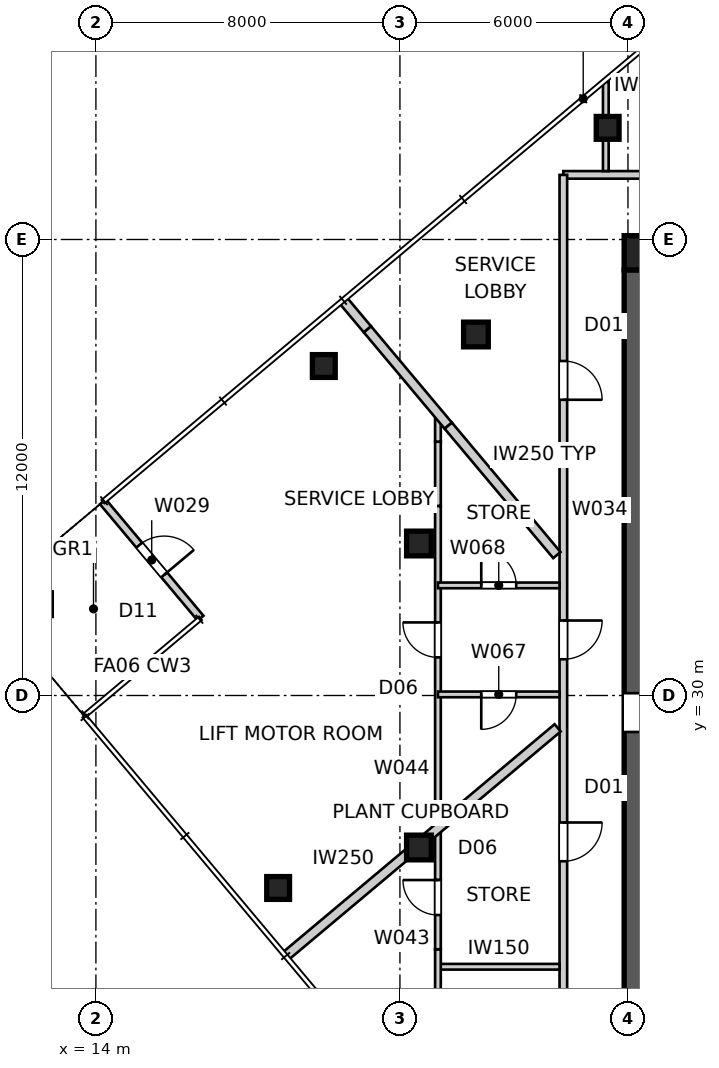
"""IFC4 building model, lengths in metres.
Left out: names, types, materials, properties, quantities, classifications, styles, units other than length and angle.
Written with IfcOpenShell. Run it as: python <this file> out.ifc"""

import sys

from ifc_helpers import new_model, si_unit, direction, frame, frame_2d, origin, origin_2d, place, context, subcontext, project, spatial, polyline, rectangle, outline, extrude, element, fill, save


model = new_model("IFC4")
c1 = context("Model", 3, precision=1e-05, world=origin(), true_north=direction((0.0, 1.0)))
c2 = subcontext(c1, "Body", "Model", "MODEL_VIEW")
j1 = project(units=[si_unit("LENGTHUNIT", "METRE"), si_unit("PLANEANGLEUNIT", "RADIAN")], contexts=[c1])
p1 = place(None, origin())
s1 = spatial("IfcSite", under=j1, at=p1, CompositionType="ELEMENT")
p2 = place(p1, origin())
s2 = spatial("IfcBuilding", under=s1, at=p2, CompositionType="ELEMENT")
p3 = place(p2, frame((0.0, 0.0, 304.3)))
s3 = spatial("IfcBuildingStorey", under=s2, at=p3, CompositionType="ELEMENT", Elevation=304.3)
p4 = place(p3, frame((28.35, 41.2, 0.0), z_axis=(0.0, 0.0, 1.0), x_axis=(0.0, -1.0, 0.0)))
e1 = element("IfcWall", 1, at=p4, inside=s3, PredefinedType="SHEAR", context=c2, shape_type="SweptSolid", body=[
    extrude(outline(polyline([(0.0, -0.45), (22.4, -0.45), (22.4, -0.025), (22.85, -0.025), (22.85, 0.025), (22.4, 0.025), (22.4, 0.45), (0.0, 0.45), (0.0, 0.025), (-0.45, 0.025), (-0.45, -0.025), (0.0, -0.025), (0.0, -0.45)])), origin(), (0.0, 0.0, 1.0), 4.5),
])
p5 = place(p4, frame((11.14, 0.0, 0.0)))
e2 = element("IfcOpeningElement", 2, at=p5, cuts=e1, PredefinedType="OPENING", context=c2, shape_type="SweptSolid", body=[
    extrude(rectangle(XDim=1.02, YDim=2.4, at=frame_2d((0.51, 1.2))), frame((0.0, 0.46, 0.0), z_axis=(0.0, -1.0, 0.0), x_axis=(1.0, 0.0, 0.0)), (0.0, 0.0, 1.0), 0.92),
])
p6 = place(p3, frame((28.35, 41.65, 0.0), z_axis=(0.0, 0.0, 1.0), x_axis=(1.0, 0.0, 0.0)))
e3 = element("IfcColumn", 3, at=p6, inside=s3, PredefinedType="COLUMN", context=c2, shape_type="SweptSolid", body=[
    extrude(rectangle(XDim=0.9, YDim=0.9, at=origin_2d()), origin(), (0.0, 0.0, 1.0), 4.5),
])
for number, where, z_axis, x_axis in (
    (4, (27.466, 44.938, 0.0), (0.0, 0.0, 1.0), (1.0, 0.0, 0.0)),
    (5, (19.997, 38.671, 0.0), (0.0, 0.0, 1.0), (1.0, 0.0, 0.0)),
    (6, (18.795, 24.935, 0.0), (0.0, 0.0, 1.0), (1.0, 0.0, 0.0)),
):
    element("IfcColumn", number, at=place(p3, frame(where, z_axis=z_axis, x_axis=x_axis)), inside=s3, PredefinedType="COLUMN", context=c2, shape_type="SweptSolid", body=[
        extrude(rectangle(XDim=0.6, YDim=0.6, at=origin_2d()), origin(), (0.0, 0.0, 1.0), 4.5),
    ])
for number, where, z_axis, x_axis in (
    (7, (24.0, 39.5, 0.0), (0.0, 0.0, 1.0), (1.0, 0.0, 0.0)),
    (8, (22.5, 34.0, 0.0), (0.0, 0.0, 1.0), (1.0, 0.0, 0.0)),
    (9, (22.5, 26.0, 0.0), (0.0, 0.0, 1.0), (1.0, 0.0, 0.0)),
):
    element("IfcColumn", number, at=place(p3, frame(where, z_axis=z_axis, x_axis=x_axis)), inside=s3, PredefinedType="COLUMN", context=c2, shape_type="SweptSolid", body=[
        extrude(rectangle(XDim=0.65, YDim=0.65, at=origin_2d()), origin(), (0.0, 0.0, 1.0), 4.5),
    ])
p7 = place(p3, frame((14.183, 35.098, 0.0), z_axis=(0.0, 0.0, 1.0), x_axis=(0.642768287094, -0.766060656284, 0.0)))
e10 = element("IfcWall", 10, at=p7, inside=s3, PredefinedType="SOLIDWALL", context=c2, shape_type="SweptSolid", body=[
    extrude(rectangle(XDim=4.0, YDim=0.2, at=frame_2d((2.0, 0.0))), origin(), (0.0, 0.0, 1.0), 4.25),
])
p8 = place(p7, frame((1.49, 0.0, 0.0)))
e11 = element("IfcOpeningElement", 11, at=p8, cuts=e10, PredefinedType="OPENING", context=c2, shape_type="SweptSolid", body=[
    extrude(rectangle(XDim=1.02, YDim=2.1, at=frame_2d((0.51, 1.05))), frame((0.0, 0.11, 0.0), z_axis=(0.0, -1.0, 0.0), x_axis=(1.0, 0.0, 0.0)), (0.0, 0.0, 1.0), 0.22),
])
p9 = place(p3, frame((53.7, 43.7, 0.0), z_axis=(0.0, 0.0, 1.0), x_axis=(-1.0, 0.0, 0.0)))
e12 = element("IfcWall", 12, at=p9, inside=s3, PredefinedType="PARTITIONING", context=c2, shape_type="SweptSolid", body=[
    extrude(rectangle(XDim=27.4, YDim=0.2, at=frame_2d((13.7, 0.0))), origin(), (0.0, 0.0, 1.0), 4.25),
])
p10 = place(p9, frame((20.621, 0.0, 0.0)))
e13 = element("IfcOpeningElement", 13, at=p10, cuts=e12, PredefinedType="OPENING", context=c2, shape_type="SweptSolid", body=[
    extrude(rectangle(XDim=1.02, YDim=2.34, at=frame_2d((0.51, 1.17))), frame((0.0, 0.11, 0.0), z_axis=(0.0, -1.0, 0.0), x_axis=(1.0, 0.0, 0.0)), (0.0, 0.0, 1.0), 0.22),
])
p11 = place(p9, frame((6.053, 0.0, 0.0)))
e14 = element("IfcOpeningElement", 14, at=p11, cuts=e12, PredefinedType="OPENING", context=c2, shape_type="SweptSolid", body=[
    extrude(rectangle(XDim=1.02, YDim=2.34, at=frame_2d((0.51, 1.17))), frame((0.0, 0.11, 0.0), z_axis=(0.0, -1.0, 0.0), x_axis=(1.0, 0.0, 0.0)), (0.0, 0.0, 1.0), 0.22),
])
p12 = place(p9, frame((12.574, 0.0, 0.0)))
e15 = element("IfcOpeningElement", 15, at=p12, cuts=e12, PredefinedType="OPENING", context=c2, shape_type="SweptSolid", body=[
    extrude(rectangle(XDim=1.02, YDim=2.34, at=frame_2d((0.51, 1.17))), frame((0.0, 0.11, 0.0), z_axis=(0.0, -1.0, 0.0), x_axis=(1.0, 0.0, 0.0)), (0.0, 0.0, 1.0), 0.22),
])
p13 = place(p3, frame((26.3, 43.7, 0.0), z_axis=(0.0, 0.0, 1.0), x_axis=(0.0, -1.0, 0.0)))
e16 = element("IfcWall", 16, at=p13, inside=s3, PredefinedType="PARTITIONING", context=c2, shape_type="SweptSolid", body=[
    extrude(rectangle(XDim=27.4, YDim=0.2, at=frame_2d((13.7, 0.0))), origin(), (0.0, 0.0, 1.0), 4.25),
])
p14 = place(p13, frame((4.898, 0.0, 0.0)))
e17 = element("IfcOpeningElement", 17, at=p14, cuts=e16, PredefinedType="OPENING", context=c2, shape_type="SweptSolid", body=[
    extrude(rectangle(XDim=1.02, YDim=2.34, at=frame_2d((0.51, 1.17))), frame((0.0, 0.11, 0.0), z_axis=(0.0, -1.0, 0.0), x_axis=(1.0, 0.0, 0.0)), (0.0, 0.0, 1.0), 0.22),
])
p15 = place(p13, frame((17.042, 0.0, 0.0)))
e18 = element("IfcOpeningElement", 18, at=p15, cuts=e16, PredefinedType="OPENING", context=c2, shape_type="SweptSolid", body=[
    extrude(rectangle(XDim=1.02, YDim=2.34, at=frame_2d((0.51, 1.17))), frame((0.0, 0.11, 0.0), z_axis=(0.0, -1.0, 0.0), x_axis=(1.0, 0.0, 0.0)), (0.0, 0.0, 1.0), 0.22),
])
p16 = place(p13, frame((23.434, 0.0, 0.0)))
e19 = element("IfcOpeningElement", 19, at=p16, cuts=e16, PredefinedType="OPENING", context=c2, shape_type="SweptSolid", body=[
    extrude(rectangle(XDim=1.02, YDim=2.34, at=frame_2d((0.51, 1.17))), frame((0.0, 0.11, 0.0), z_axis=(0.0, -1.0, 0.0), x_axis=(1.0, 0.0, 0.0)), (0.0, 0.0, 1.0), 0.22),
])
p17 = place(p13, frame((11.727, 0.0, 0.0)))
e20 = element("IfcOpeningElement", 20, at=p17, cuts=e16, PredefinedType="OPENING", context=c2, shape_type="SweptSolid", body=[
    extrude(rectangle(XDim=1.02, YDim=2.34, at=frame_2d((0.51, 1.17))), frame((0.0, 0.11, 0.0), z_axis=(0.0, -1.0, 0.0), x_axis=(1.0, 0.0, 0.0)), (0.0, 0.0, 1.0), 0.22),
])
p18 = place(p3, frame((20.503, 40.401, 0.0), z_axis=(0.0, 0.0, 1.0), x_axis=(0.64277405138, -0.766055819685, 0.0)))
e21 = element("IfcWall", 21, at=p18, inside=s3, PredefinedType="PARTITIONING", context=c2, shape_type="SweptSolid", body=[
    extrude(rectangle(XDim=1.0, YDim=0.25, at=frame_2d((0.5, 0.0))), origin(), (0.0, 0.0, 1.0), 4.25),
])
p19 = place(p3, frame((21.146, 39.635, 0.0), z_axis=(0.0, 0.0, 1.0), x_axis=(0.642823301165, -0.766014492995, 0.0)))
e22 = element("IfcWall", 22, at=p19, inside=s3, PredefinedType="PARTITIONING", context=c2, shape_type="SweptSolid", body=[
    extrude(rectangle(XDim=3.308, YDim=0.25, at=frame_2d((1.654, 0.0))), origin(), (0.0, 0.0, 1.0), 3.638),
])
p20 = place(p3, frame((23.272, 37.101, 0.0), z_axis=(0.0, 0.0, 1.0), x_axis=(0.642778620996, -0.766051985436, 0.0)))
e23 = element("IfcWall", 23, at=p20, inside=s3, PredefinedType="PARTITIONING", context=c2, shape_type="SweptSolid", body=[
    extrude(rectangle(XDim=4.446, YDim=0.25, at=frame_2d((2.223, 0.0))), origin(), (0.0, 0.0, 1.0), 4.25),
])
p21 = place(p3, frame((18.993, 23.143, 0.0), z_axis=(0.0, 0.0, 1.0), x_axis=(0.766045019392, 0.64278692291, 0.0)))
e24 = element("IfcWall", 24, at=p21, inside=s3, PredefinedType="PARTITIONING", context=c2, shape_type="SweptSolid", body=[
    extrude(rectangle(XDim=9.343, YDim=0.25, at=frame_2d((4.671, 0.0))), origin(), (0.0, 0.0, 1.0), 4.25),
])
p22 = place(p3, frame((23.0, 22.862, 0.0), z_axis=(0.0, 0.0, 1.0), x_axis=(1.0, 0.0, 0.0)))
e25 = element("IfcWall", 25, at=p22, inside=s3, PredefinedType="SOLIDWALL", context=c2, shape_type="SweptSolid", body=[
    extrude(rectangle(XDim=3.2, YDim=0.15, at=frame_2d((1.6, 0.0))), origin(), (0.0, 0.0, 1.0), 4.25),
])
p23 = place(p3, frame((23.0, 18.43, 0.0), z_axis=(0.0, 0.0, 1.0), x_axis=(0.0, 1.0, 0.0)))
e26 = element("IfcWall", 26, at=p23, inside=s3, PredefinedType="SOLIDWALL", context=c2, shape_type="SweptSolid", body=[
    extrude(rectangle(XDim=4.892, YDim=0.15, at=frame_2d((2.446, 0.0))), origin(), (0.0, 0.0, 1.0), 4.25),
])
p24 = place(p3, frame((23.0, 23.322, 0.0), z_axis=(0.0, 0.0, 1.0), x_axis=(0.0, 1.0, 0.0)))
e27 = element("IfcWall", 27, at=p24, inside=s3, PredefinedType="SOLIDWALL", context=c2, shape_type="SweptSolid", body=[
    extrude(rectangle(XDim=1.822, YDim=0.15, at=frame_2d((0.911, 0.0))), origin(), (0.0, 0.0, 1.0), 3.25),
])
p25 = place(p24, frame((0.902, 0.0, 0.0)))
e28 = element("IfcOpeningElement", 28, at=p25, cuts=e27, PredefinedType="OPENING", context=c2, shape_type="SweptSolid", body=[
    extrude(rectangle(XDim=0.92, YDim=2.1, at=frame_2d((0.46, 1.05))), frame((0.0, 0.085, 0.0), z_axis=(0.0, -1.0, 0.0), x_axis=(1.0, 0.0, 0.0)), (0.0, 0.0, 1.0), 0.17),
])
p26 = place(p3, frame((23.0, 25.143, 0.0), z_axis=(0.0, 0.0, 1.0), x_axis=(0.0, 1.0, 0.0)))
e29 = element("IfcWall", 29, at=p26, inside=s3, PredefinedType="SOLIDWALL", context=c2, shape_type="SweptSolid", body=[
    extrude(rectangle(XDim=9.845, YDim=0.15, at=frame_2d((4.922, 0.0))), origin(), (0.0, 0.0, 1.0), 4.25),
])
p27 = place(p26, frame((5.86, 0.0, 0.0)))
e30 = element("IfcOpeningElement", 30, at=p27, cuts=e29, PredefinedType="OPENING", context=c2, shape_type="SweptSolid", body=[
    extrude(rectangle(XDim=0.92, YDim=2.1, at=frame_2d((0.46, 1.05))), frame((0.0, 0.085, 0.0), z_axis=(0.0, -1.0, 0.0), x_axis=(1.0, 0.0, 0.0)), (0.0, 0.0, 1.0), 0.17),
])
p28 = place(p3, frame((23.0, 34.988, 0.0), z_axis=(0.0, 0.0, 1.0), x_axis=(0.0, 1.0, 0.0)))
e31 = element("IfcWall", 31, at=p28, inside=s3, PredefinedType="SOLIDWALL", context=c2, shape_type="SweptSolid", body=[
    extrude(rectangle(XDim=1.69, YDim=0.15, at=frame_2d((0.845, 0.0))), origin(), (0.0, 0.0, 1.0), 3.25),
])
p29 = place(p3, frame((23.0, 36.678, 0.0), z_axis=(0.0, 0.0, 1.0), x_axis=(0.0, 1.0, 0.0)))
e32 = element("IfcWall", 32, at=p29, inside=s3, PredefinedType="SOLIDWALL", context=c2, shape_type="SweptSolid", body=[
    extrude(rectangle(XDim=0.747, YDim=0.15, at=frame_2d((0.373, 0.0))), origin(), (0.0, 0.0, 1.0), 4.25),
])
p30 = place(p3, frame((27.417, 46.15, 0.0), z_axis=(0.0, 0.0, 1.0), x_axis=(0.0, -1.0, 0.0)))
e33 = element("IfcWall", 33, at=p30, inside=s3, PredefinedType="SOLIDWALL", context=c2, shape_type="SweptSolid", body=[
    extrude(rectangle(XDim=2.35, YDim=0.15, at=frame_2d((1.175, 0.0))), origin(), (0.0, 0.0, 1.0), 4.25),
])
p31 = place(p3, frame((26.2, 30.029, 0.0), z_axis=(0.0, 0.0, 1.0), x_axis=(-1.0, 0.0, 0.0)))
e34 = element("IfcWall", 34, at=p31, inside=s3, PredefinedType="SOLIDWALL", context=c2, shape_type="SweptSolid", body=[
    extrude(rectangle(XDim=3.2, YDim=0.15, at=frame_2d((1.6, 0.0))), origin(), (0.0, 0.0, 1.0), 3.722),
])
p32 = place(p31, frame((1.14, 0.0, 0.0)))
e35 = element("IfcOpeningElement", 35, at=p32, cuts=e34, PredefinedType="OPENING", context=c2, shape_type="SweptSolid", body=[
    extrude(rectangle(XDim=0.92, YDim=2.1, at=frame_2d((0.46, 1.05))), frame((0.0, 0.085, 0.0), z_axis=(0.0, -1.0, 0.0), x_axis=(1.0, 0.0, 0.0)), (0.0, 0.0, 1.0), 0.17),
])
p33 = place(p3, frame((23.0, 32.897, 0.0), z_axis=(0.0, 0.0, 1.0), x_axis=(1.0, 0.0, 0.0)))
e36 = element("IfcWall", 36, at=p33, inside=s3, PredefinedType="SOLIDWALL", context=c2, shape_type="SweptSolid", body=[
    extrude(rectangle(XDim=3.2, YDim=0.15, at=frame_2d((1.6, 0.0))), origin(), (0.0, 0.0, 1.0), 3.722),
])
p34 = place(p33, frame((1.14, 0.0, 0.0)))
e37 = element("IfcOpeningElement", 37, at=p34, cuts=e36, PredefinedType="OPENING", context=c2, shape_type="SweptSolid", body=[
    extrude(rectangle(XDim=0.92, YDim=2.1, at=frame_2d((0.46, 1.05))), frame((0.0, 0.085, 0.0), z_axis=(0.0, -1.0, 0.0), x_axis=(1.0, 0.0, 0.0)), (0.0, 0.0, 1.0), 0.17),
])
p35 = place(p8, origin())
e38 = element("IfcDoor", 38, at=p35, inside=s3, OperationType="SINGLE_SWING_RIGHT", PredefinedType="DOOR", context=c2, shape_type="SweptSolid", body=[
    extrude(rectangle(XDim=1.02, YDim=2.1, at=frame_2d((0.51, 1.05))), frame((0.0, 0.025, 0.0), z_axis=(0.0, -1.0, 0.0), x_axis=(1.0, 0.0, 0.0)), (0.0, 0.0, 1.0), 0.05),
])
fill(e11, e38)
p36 = place(p14, origin())
e39 = element("IfcDoor", 39, at=p36, inside=s3, OperationType="SINGLE_SWING_RIGHT", PredefinedType="DOOR", context=c2, shape_type="SweptSolid", body=[
    extrude(rectangle(XDim=1.02, YDim=2.34, at=frame_2d((0.51, 1.17))), frame((0.0, 0.025, 0.0), z_axis=(0.0, -1.0, 0.0), x_axis=(1.0, 0.0, 0.0)), (0.0, 0.0, 1.0), 0.05),
])
fill(e17, e39)
p37 = place(p15, origin())
e40 = element("IfcDoor", 40, at=p37, inside=s3, OperationType="SINGLE_SWING_LEFT", PredefinedType="DOOR", context=c2, shape_type="SweptSolid", body=[
    extrude(rectangle(XDim=1.02, YDim=2.34, at=frame_2d((0.51, 1.17))), frame((0.0, 0.025, 0.0), z_axis=(0.0, -1.0, 0.0), x_axis=(1.0, 0.0, 0.0)), (0.0, 0.0, 1.0), 0.05),
])
fill(e18, e40)
p38 = place(p17, origin())
e41 = element("IfcDoor", 41, at=p38, inside=s3, OperationType="SINGLE_SWING_LEFT", PredefinedType="DOOR", context=c2, shape_type="SweptSolid", body=[
    extrude(rectangle(XDim=1.02, YDim=2.34, at=frame_2d((0.51, 1.17))), frame((0.0, 0.025, 0.0), z_axis=(0.0, -1.0, 0.0), x_axis=(1.0, 0.0, 0.0)), (0.0, 0.0, 1.0), 0.05),
])
fill(e20, e41)
p39 = place(p25, origin())
e42 = element("IfcDoor", 42, at=p39, inside=s3, OperationType="SINGLE_SWING_RIGHT", PredefinedType="DOOR", context=c2, shape_type="SweptSolid", body=[
    extrude(rectangle(XDim=0.92, YDim=2.1, at=frame_2d((0.46, 1.05))), frame((0.0, 0.025, 0.0), z_axis=(0.0, -1.0, 0.0), x_axis=(1.0, 0.0, 0.0)), (0.0, 0.0, 1.0), 0.05),
])
fill(e28, e42)
p40 = place(p32, origin())
e43 = element("IfcDoor", 43, at=p40, inside=s3, OperationType="SINGLE_SWING_RIGHT", PredefinedType="DOOR", context=c2, shape_type="SweptSolid", body=[
    extrude(rectangle(XDim=0.92, YDim=2.1, at=frame_2d((0.46, 1.05))), frame((0.0, 0.025, 0.0), z_axis=(0.0, -1.0, 0.0), x_axis=(1.0, 0.0, 0.0)), (0.0, 0.0, 1.0), 0.05),
])
fill(e35, e43)
p41 = place(p34, origin())
e44 = element("IfcDoor", 44, at=p41, inside=s3, OperationType="SINGLE_SWING_LEFT", PredefinedType="DOOR", context=c2, shape_type="SweptSolid", body=[
    extrude(rectangle(XDim=0.92, YDim=2.1, at=frame_2d((0.46, 1.05))), frame((0.0, 0.025, 0.0), z_axis=(0.0, -1.0, 0.0), x_axis=(1.0, 0.0, 0.0)), (0.0, 0.0, 1.0), 0.05),
])
fill(e37, e44)
p42 = place(p27, origin())
e45 = element("IfcDoor", 45, at=p42, inside=s3, OperationType="SINGLE_SWING_RIGHT", PredefinedType="DOOR", context=c2, shape_type="SweptSolid", body=[
    extrude(rectangle(XDim=0.92, YDim=2.1, at=frame_2d((0.46, 1.05))), frame((0.0, 0.025, 0.0), z_axis=(0.0, -1.0, 0.0), x_axis=(1.0, 0.0, 0.0)), (0.0, 0.0, 1.0), 0.05),
])
fill(e30, e45)
save(model, sys.argv[1])
